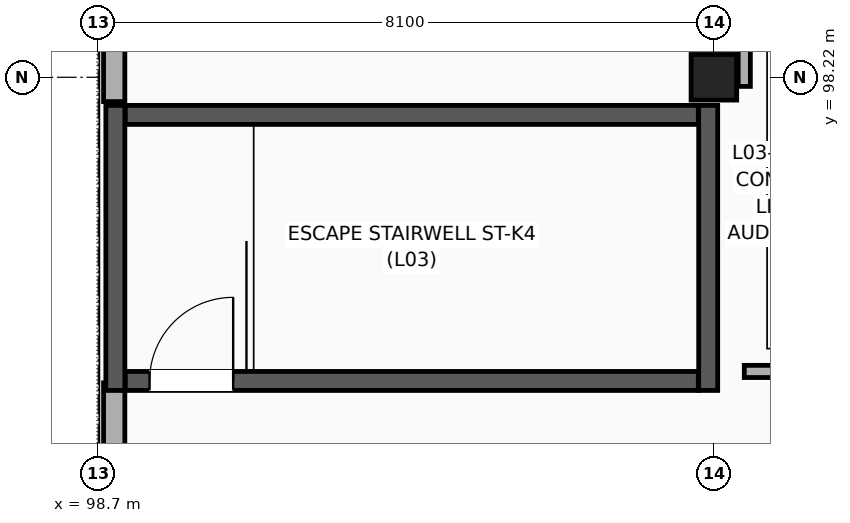
"""IFC4 building model, lengths in metres.
Left out: names, types, materials, properties, quantities, classifications, styles, units other than length and angle.
Written with IfcOpenShell. Run it as: python <this file> out.ifc"""

import sys

from ifc_helpers import new_model, si_unit, direction, frame, frame_2d, origin, origin_2d, place, context, subcontext, project, spatial, rectangle, extrude, element, fill, save


model = new_model("IFC4")
c1 = context("Model", 3, precision=1e-05, world=origin(), true_north=direction((0.0, 1.0)))
c2 = subcontext(c1, "Body", "Model", "MODEL_VIEW")
j1 = project(units=[si_unit("LENGTHUNIT", "METRE"), si_unit("PLANEANGLEUNIT", "RADIAN")], contexts=[c1])
p1 = place(None, origin())
s1 = spatial("IfcSite", under=j1, at=p1, CompositionType="ELEMENT")
p2 = place(p1, origin())
s2 = spatial("IfcBuilding", under=s1, at=p2, CompositionType="ELEMENT")
p3 = place(p2, frame((0.0, 0.0, 14.7)))
s3 = spatial("IfcBuildingStorey", under=s2, at=p3, CompositionType="ELEMENT", Elevation=14.7)
p4 = place(p3, frame((106.8, 98.22, 0.0), z_axis=(0.0, 0.0, 1.0), x_axis=(1.0, 0.0, 0.0)))
e1 = element("IfcColumn", 1, at=p4, inside=s3, PredefinedType="COLUMN", context=c2, shape_type="SweptSolid", body=[
    extrude(rectangle(XDim=0.6, YDim=0.6, at=origin_2d()), origin(), (0.0, 0.0, 1.0), 4.5),
])
p5 = place(p3, frame((98.91, 88.6, 0.0), z_axis=(0.0, 0.0, 1.0), x_axis=(0.0, 1.0, 0.0)))
e2 = element("IfcWall", 2, at=p5, inside=s3, PredefinedType="SOLIDWALL", context=c2, shape_type="SweptSolid", body=[
    extrude(rectangle(XDim=5.6, YDim=0.28, at=frame_2d((2.8, 0.0))), origin(), (0.0, 0.0, 1.0), 4.225),
])
p6 = place(p3, frame((98.91, 97.9, 0.0), z_axis=(0.0, 0.0, 1.0), x_axis=(0.0, 1.0, 0.0)))
e3 = element("IfcWall", 3, at=p6, inside=s3, PredefinedType="SOLIDWALL", context=c2, shape_type="SweptSolid", body=[
    extrude(rectangle(XDim=15.05, YDim=0.28, at=frame_2d((7.525, 0.0))), origin(), (0.0, 0.0, 1.0), 4.225),
])
p7 = place(p3, frame((99.055, 94.225, 0.0), z_axis=(0.0, 0.0, 1.0), x_axis=(1.0, 0.0, 0.0)))
e4 = element("IfcWall", 4, at=p7, inside=s3, PredefinedType="SHEAR", context=c2, shape_type="SweptSolid", body=[
    extrude(rectangle(XDim=7.54, YDim=0.25, at=frame_2d((3.77, 0.0))), origin(), (0.0, 0.0, 1.0), 4.245),
])
p8 = place(p7, frame((0.32, 0.0, 0.0)))
e5 = element("IfcOpeningElement", 5, at=p8, cuts=e4, PredefinedType="OPENING", context=c2, shape_type="SweptSolid", body=[
    extrude(rectangle(XDim=1.1, YDim=2.2, at=frame_2d((0.55, 1.1))), frame((0.0, 0.135, 0.0), z_axis=(0.0, -1.0, 0.0), x_axis=(1.0, 0.0, 0.0)), (0.0, 0.0, 1.0), 0.27),
])
p9 = place(p3, frame((99.055, 97.725, 0.0), z_axis=(0.0, 0.0, 1.0), x_axis=(1.0, 0.0, 0.0)))
e6 = element("IfcWall", 6, at=p9, inside=s3, PredefinedType="SHEAR", context=c2, shape_type="SweptSolid", body=[
    extrude(rectangle(XDim=7.54, YDim=0.25, at=frame_2d((3.77, 0.0))), origin(), (0.0, 0.0, 1.0), 4.245),
])
for number, where, z_axis, x_axis in (
    (7, (98.925, 94.1, 0.0), (0.0, 0.0, 1.0), (0.0, 1.0, 0.0)),
    (8, (106.725, 94.1, 0.0), (0.0, 0.0, 1.0), (0.0, 1.0, 0.0)),
):
    element("IfcWall", number, at=place(p3, frame(where, z_axis=z_axis, x_axis=x_axis)), inside=s3, PredefinedType="SHEAR", context=c2, shape_type="SweptSolid", body=[
        extrude(rectangle(XDim=3.75, YDim=0.25, at=frame_2d((1.875, 0.0))), origin(), (0.0, 0.0, 1.0), 4.245),
    ])
p10 = place(p3, frame((107.2, 94.35, 0.0), z_axis=(0.0, 0.0, 1.0), x_axis=(1.0, 0.0, 0.0)))
e9 = element("IfcWall", 9, at=p10, inside=s3, PredefinedType="PARTITIONING", context=c2, shape_type="SweptSolid", body=[
    extrude(rectangle(XDim=1.8, YDim=0.16, at=frame_2d((0.9, 0.0))), origin(), (0.0, 0.0, 1.0), 4.225),
])
p11 = place(p3, frame((107.2, 98.1, 0.0), z_axis=(0.0, 0.0, 1.0), x_axis=(0.0, 1.0, 0.0)))
e10 = element("IfcWall", 10, at=p11, inside=s3, PredefinedType="PARTITIONING", context=c2, shape_type="SweptSolid", body=[
    extrude(rectangle(XDim=0.9, YDim=0.16, at=frame_2d((0.45, 0.0))), origin(), (0.0, 0.0, 1.0), 3.427),
])
p12 = place(p8, origin())
e11 = element("IfcDoor", 11, at=p12, inside=s3, OperationType="SINGLE_SWING_RIGHT", PredefinedType="DOOR", context=c2, shape_type="SweptSolid", body=[
    extrude(rectangle(XDim=1.1, YDim=2.2, at=frame_2d((0.55, 1.1))), frame((0.0, 0.025, 0.0), z_axis=(0.0, -1.0, 0.0), x_axis=(1.0, 0.0, 0.0)), (0.0, 0.0, 1.0), 0.05),
])
fill(e5, e11)
save(model, sys.argv[1])
